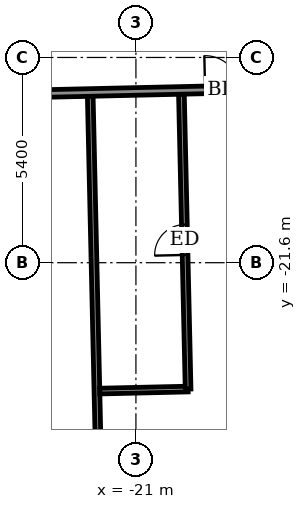
"""IFC4 building model, lengths in metres.
Left out: names, types, materials, properties, quantities, classifications, styles, units other than length and angle.
Written with IfcOpenShell. Run it as: python <this file> out.ifc"""

import sys

from ifc_helpers import new_model, si_unit, direction, frame, frame_2d, origin, place, context, subcontext, project, spatial, rectangle, extrude, element, fill, save


model = new_model("IFC4")
c1 = context("Model", 3, precision=1e-05, world=origin(), true_north=direction((0.0, 1.0)))
c2 = subcontext(c1, "Body", "Model", "MODEL_VIEW")
j1 = project(units=[si_unit("LENGTHUNIT", "METRE"), si_unit("PLANEANGLEUNIT", "RADIAN")], contexts=[c1])
p1 = place(None, origin())
s1 = spatial("IfcSite", under=j1, at=p1, CompositionType="ELEMENT")
p2 = place(p1, origin())
s2 = spatial("IfcBuilding", under=s1, at=p2, CompositionType="ELEMENT")
p3 = place(p2, frame((0.0, 0.0, 34.1)))
s3 = spatial("IfcBuildingStorey", under=s2, at=p3, CompositionType="ELEMENT", Elevation=34.1)
p4 = place(p3, frame((-21.921, -29.618, 0.0), z_axis=(0.0, 0.0, 1.0), x_axis=(-0.022661475803, 0.999743195783, 0.0)))
e1 = element("IfcWall", 1, at=p4, inside=s3, PredefinedType="PARTITIONING", context=c2, shape_type="SweptSolid", body=[
    extrude(rectangle(XDim=12.4, YDim=0.15, at=frame_2d((6.2, 0.0))), origin(), (0.0, 0.0, 1.0), 2.55),
])
p5 = place(p3, frame((-21.951, -24.978, 0.0), z_axis=(0.0, 0.0, 1.0), x_axis=(0.999740260747, 0.02279059109, 0.0)))
e2 = element("IfcWall", 2, at=p5, inside=s3, PredefinedType="PARTITIONING", context=c2, shape_type="SweptSolid", body=[
    extrude(rectangle(XDim=2.324, YDim=0.15, at=frame_2d((1.162, 0.0))), origin(), (0.0, 0.0, 1.0), 3.05),
])
p6 = place(p3, frame((-19.627, -24.925, 0.0), z_axis=(0.0, 0.0, 1.0), x_axis=(-0.022683528451, 0.999742695666, 0.0)))
e3 = element("IfcWall", 3, at=p6, inside=s3, PredefinedType="PARTITIONING", context=c2, shape_type="SweptSolid", body=[
    extrude(rectangle(XDim=7.76, YDim=0.15, at=frame_2d((3.88, 0.0))), origin(), (0.0, 0.0, 1.0), 3.05),
])
p7 = place(p6, frame((3.53, 0.0, 0.0)))
e4 = element("IfcOpeningElement", 4, at=p7, cuts=e3, PredefinedType="OPENING", context=c2, shape_type="SweptSolid", body=[
    extrude(rectangle(XDim=0.8, YDim=2.1, at=frame_2d((0.4, 1.05))), frame((0.0, 0.085, 0.0), z_axis=(0.0, -1.0, 0.0), x_axis=(1.0, 0.0, 0.0)), (0.0, 0.0, 1.0), 0.17),
])
p8 = place(p3, frame((-30.652, -17.313, 0.0), z_axis=(0.0, 0.0, 1.0), x_axis=(0.999742623764, 0.02268669719, 0.0)))
e5 = element("IfcWall", 5, at=p8, inside=s3, PredefinedType="PARTITIONING", context=c2, shape_type="SweptSolid", body=[
    extrude(rectangle(XDim=58.8, YDim=0.2, at=frame_2d((29.4, 0.0))), origin(), (0.0, 0.0, 1.0), 3.05),
])
p9 = place(p8, frame((3.406, 0.0, 0.0)))
e6 = element("IfcOpeningElement", 6, at=p9, cuts=e5, PredefinedType="OPENING", context=c2, shape_type="SweptSolid", body=[
    extrude(rectangle(XDim=1.0, YDim=2.1, at=frame_2d((0.5, 1.05))), frame((0.0, 0.11, 0.0), z_axis=(0.0, -1.0, 0.0), x_axis=(1.0, 0.0, 0.0)), (0.0, 0.0, 1.0), 0.22),
])
p10 = place(p8, frame((11.475, 0.0, 0.0)))
e7 = element("IfcOpeningElement", 7, at=p10, cuts=e5, PredefinedType="OPENING", context=c2, shape_type="SweptSolid", body=[
    extrude(rectangle(XDim=0.9, YDim=2.1, at=frame_2d((0.45, 1.05))), frame((0.0, 0.11, 0.0), z_axis=(0.0, -1.0, 0.0), x_axis=(1.0, 0.0, 0.0)), (0.0, 0.0, 1.0), 0.22),
])
p11 = place(p8, frame((13.55, 0.0, 0.0)))
e8 = element("IfcOpeningElement", 8, at=p11, cuts=e5, PredefinedType="OPENING", context=c2, shape_type="SweptSolid", body=[
    extrude(rectangle(XDim=0.9, YDim=2.1, at=frame_2d((0.45, 1.05))), frame((0.0, 0.11, 0.0), z_axis=(0.0, -1.0, 0.0), x_axis=(1.0, 0.0, 0.0)), (0.0, 0.0, 1.0), 0.22),
])
p12 = place(p8, frame((20.375, 0.0, 0.0)))
e9 = element("IfcOpeningElement", 9, at=p12, cuts=e5, PredefinedType="OPENING", context=c2, shape_type="SweptSolid", body=[
    extrude(rectangle(XDim=0.9, YDim=2.1, at=frame_2d((0.45, 1.05))), frame((0.0, 0.11, 0.0), z_axis=(0.0, -1.0, 0.0), x_axis=(1.0, 0.0, 0.0)), (0.0, 0.0, 1.0), 0.22),
])
p13 = place(p8, frame((22.625, 0.0, 0.0)))
e10 = element("IfcOpeningElement", 10, at=p13, cuts=e5, PredefinedType="OPENING", context=c2, shape_type="SweptSolid", body=[
    extrude(rectangle(XDim=0.9, YDim=2.1, at=frame_2d((0.45, 1.05))), frame((0.0, 0.11, 0.0), z_axis=(0.0, -1.0, 0.0), x_axis=(1.0, 0.0, 0.0)), (0.0, 0.0, 1.0), 0.22),
])
p14 = place(p8, frame((29.65, 0.0, 0.0)))
e11 = element("IfcOpeningElement", 11, at=p14, cuts=e5, PredefinedType="OPENING", context=c2, shape_type="SweptSolid", body=[
    extrude(rectangle(XDim=0.9, YDim=2.1, at=frame_2d((0.45, 1.05))), frame((0.0, 0.11, 0.0), z_axis=(0.0, -1.0, 0.0), x_axis=(1.0, 0.0, 0.0)), (0.0, 0.0, 1.0), 0.22),
])
p15 = place(p8, frame((31.875, 0.0, 0.0)))
e12 = element("IfcOpeningElement", 12, at=p15, cuts=e5, PredefinedType="OPENING", context=c2, shape_type="SweptSolid", body=[
    extrude(rectangle(XDim=0.9, YDim=2.1, at=frame_2d((0.45, 1.05))), frame((0.0, 0.11, 0.0), z_axis=(0.0, -1.0, 0.0), x_axis=(1.0, 0.0, 0.0)), (0.0, 0.0, 1.0), 0.22),
])
p16 = place(p8, frame((38.9, 0.0, 0.0)))
e13 = element("IfcOpeningElement", 13, at=p16, cuts=e5, PredefinedType="OPENING", context=c2, shape_type="SweptSolid", body=[
    extrude(rectangle(XDim=0.9, YDim=2.1, at=frame_2d((0.45, 1.05))), frame((0.0, 0.11, 0.0), z_axis=(0.0, -1.0, 0.0), x_axis=(1.0, 0.0, 0.0)), (0.0, 0.0, 1.0), 0.22),
])
p17 = place(p8, frame((41.025, 0.0, 0.0)))
e14 = element("IfcOpeningElement", 14, at=p17, cuts=e5, PredefinedType="OPENING", context=c2, shape_type="SweptSolid", body=[
    extrude(rectangle(XDim=0.9, YDim=2.1, at=frame_2d((0.45, 1.05))), frame((0.0, 0.11, 0.0), z_axis=(0.0, -1.0, 0.0), x_axis=(1.0, 0.0, 0.0)), (0.0, 0.0, 1.0), 0.22),
])
p18 = place(p8, frame((47.95, 0.0, 0.0)))
e15 = element("IfcOpeningElement", 15, at=p18, cuts=e5, PredefinedType="OPENING", context=c2, shape_type="SweptSolid", body=[
    extrude(rectangle(XDim=0.9, YDim=2.1, at=frame_2d((0.45, 1.05))), frame((0.0, 0.11, 0.0), z_axis=(0.0, -1.0, 0.0), x_axis=(1.0, 0.0, 0.0)), (0.0, 0.0, 1.0), 0.22),
])
p19 = place(p8, frame((55.6, 0.0, 0.0)))
e16 = element("IfcOpeningElement", 16, at=p19, cuts=e5, PredefinedType="OPENING", context=c2, shape_type="SweptSolid", body=[
    extrude(rectangle(XDim=1.0, YDim=2.1, at=frame_2d((0.5, 1.05))), frame((0.0, 0.11, 0.0), z_axis=(0.0, -1.0, 0.0), x_axis=(1.0, 0.0, 0.0)), (0.0, 0.0, 1.0), 0.22),
])
p20 = place(p8, frame((50.25, 0.0, 0.0)))
e17 = element("IfcOpeningElement", 17, at=p20, cuts=e5, PredefinedType="OPENING", context=c2, shape_type="SweptSolid", body=[
    extrude(rectangle(XDim=0.9, YDim=2.1, at=frame_2d((0.45, 1.05))), frame((0.0, 0.11, 0.0), z_axis=(0.0, -1.0, 0.0), x_axis=(1.0, 0.0, 0.0)), (0.0, 0.0, 1.0), 0.22),
])
p21 = place(p10, origin())
e18 = element("IfcDoor", 18, at=p21, inside=s3, OperationType="SINGLE_SWING_LEFT", PredefinedType="DOOR", context=c2, shape_type="SweptSolid", body=[
    extrude(rectangle(XDim=0.9, YDim=2.1, at=frame_2d((0.45, 1.05))), frame((0.0, 0.025, 0.0), z_axis=(0.0, -1.0, 0.0), x_axis=(1.0, 0.0, 0.0)), (0.0, 0.0, 1.0), 0.05),
])
fill(e7, e18)
p22 = place(p7, origin())
e19 = element("IfcDoor", 19, at=p22, inside=s3, OperationType="SINGLE_SWING_LEFT", PredefinedType="DOOR", context=c2, shape_type="SweptSolid", body=[
    extrude(rectangle(XDim=0.8, YDim=2.1, at=frame_2d((0.4, 1.05))), frame((0.0, 0.025, 0.0), z_axis=(0.0, -1.0, 0.0), x_axis=(1.0, 0.0, 0.0)), (0.0, 0.0, 1.0), 0.05),
])
fill(e4, e19)
save(model, sys.argv[1])
